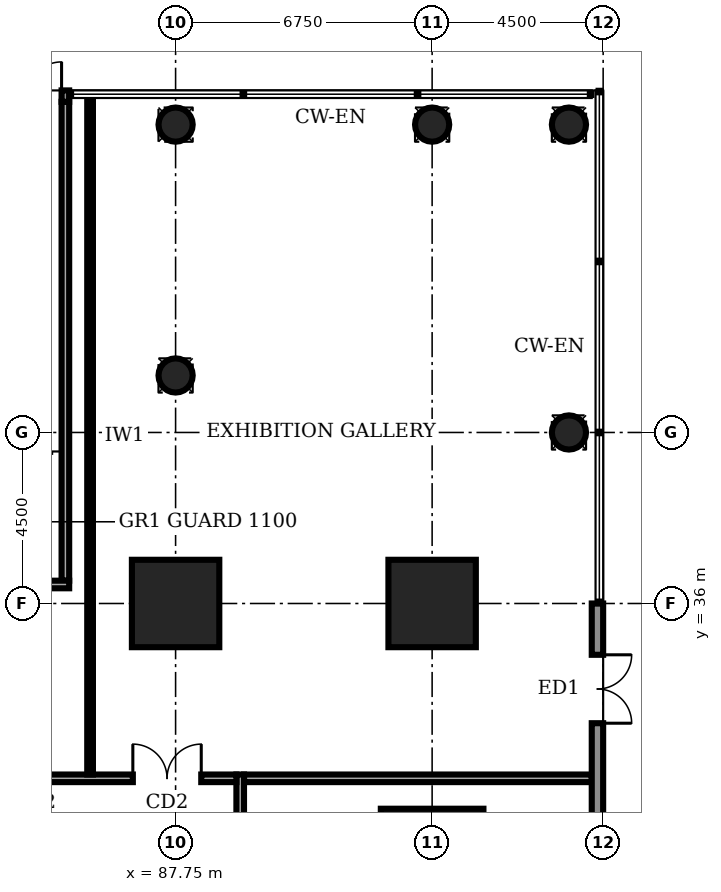
"""IFC4 building model, lengths in metres.
Left out: names, types, materials, properties, quantities, classifications, styles, units other than length and angle.
Written with IfcOpenShell. Run it as: python <this file> out.ifc"""

import sys

from ifc_helpers import new_model, si_unit, direction, frame, frame_2d, origin, origin_2d, place, context, subcontext, project, spatial, rectangle, circle, extrude, element, fill, save


model = new_model("IFC4")
c1 = context("Model", 3, precision=1e-05, world=origin(), true_north=direction((0.0, 1.0)))
c2 = subcontext(c1, "Body", "Model", "MODEL_VIEW")
j1 = project(units=[si_unit("LENGTHUNIT", "METRE"), si_unit("PLANEANGLEUNIT", "RADIAN")], contexts=[c1])
p1 = place(None, origin())
s1 = spatial("IfcSite", under=j1, at=p1, CompositionType="ELEMENT")
p2 = place(p1, origin())
s2 = spatial("IfcBuilding", under=s1, at=p2, CompositionType="ELEMENT")
p3 = place(p2, origin())
s3 = spatial("IfcBuildingStorey", under=s2, at=p3, CompositionType="ELEMENT", Elevation=0.0)
p4 = place(p3, frame((94.5, 29.25, -0.4), z_axis=(0.0, 0.0, 1.0), x_axis=(1.0, 0.0, 0.0)))
e1 = element("IfcColumn", 1, at=p4, inside=s3, PredefinedType="COLUMN", context=c2, shape_type="SweptSolid", body=[
    extrude(rectangle(XDim=2.7, YDim=2.7, at=origin_2d()), origin(), (0.0, 0.0, 1.0), 6.4),
])
for number, where, z_axis, x_axis in (
    (2, (87.75, 36.0, -0.4), (0.0, 0.0, 1.0), (1.0, 0.0, 0.0)),
    (3, (94.5, 36.0, -0.4), (0.0, 0.0, 1.0), (1.0, 0.0, 0.0)),
):
    element("IfcColumn", number, at=place(p3, frame(where, z_axis=z_axis, x_axis=x_axis)), inside=s3, PredefinedType="COLUMN", context=c2, shape_type="SweptSolid", body=[
        extrude(rectangle(XDim=2.3, YDim=2.3, at=origin_2d()), origin(), (0.0, 0.0, 1.0), 6.4),
    ])
for number, where, z_axis, x_axis in (
    (4, (87.75, 42.0, -0.4), (0.0, 0.0, 1.0), (1.0, 0.0, 0.0)),
    (5, (98.1, 40.5, -0.4), (0.0, 0.0, 1.0), (1.0, 0.0, 0.0)),
    (6, (87.75, 48.6, -0.4), (0.0, 0.0, 1.0), (1.0, 0.0, 0.0)),
    (7, (94.5, 48.6, -0.4), (0.0, 0.0, 1.0), (1.0, 0.0, 0.0)),
    (8, (98.1, 48.6, -0.4), (0.0, 0.0, 1.0), (1.0, 0.0, 0.0)),
):
    element("IfcColumn", number, at=place(p3, frame(where, z_axis=z_axis, x_axis=x_axis)), inside=s3, PredefinedType="COLUMN", context=c2, shape_type="SweptSolid", body=[
        extrude(circle(Radius=0.45, at=origin_2d()), origin(), (0.0, 0.0, 1.0), 6.4),
    ])
p5 = place(p3, frame((98.85, 27.0, 0.0), z_axis=(0.0, 0.0, 1.0), x_axis=(0.0, 1.0, 0.0)))
e9 = element("IfcWall", 9, at=p5, inside=s3, PredefinedType="STANDARD", context=c2, shape_type="SweptSolid", body=[
    extrude(rectangle(XDim=9.0, YDim=0.3, at=frame_2d((4.5, 0.0))), origin(), (0.0, 0.0, 1.0), 5.7),
])
p6 = place(p5, frame((5.85, 0.0, 0.0)))
e10 = element("IfcOpeningElement", 10, at=p6, cuts=e9, PredefinedType="OPENING", context=c2, shape_type="SweptSolid", body=[
    extrude(rectangle(XDim=1.8, YDim=2.4, at=frame_2d((0.9, 1.2))), frame((0.0, 0.16, 0.0), z_axis=(0.0, -1.0, 0.0), x_axis=(1.0, 0.0, 0.0)), (0.0, 0.0, 1.0), 0.32),
])
p7 = place(p3, frame((84.95, 49.35, 0.0), z_axis=(0.0, 0.0, 1.0), x_axis=(-1.0, 0.0, 0.0)))
e11 = element("IfcWall", 11, at=p7, inside=s3, PredefinedType="STANDARD", context=c2, shape_type="SweptSolid", body=[
    extrude(rectangle(XDim=2.2, YDim=0.3, at=frame_2d((1.1, 0.0))), origin(), (0.0, 0.0, 1.0), 5.7),
])
p8 = place(p7, frame((0.2, 0.0, 0.0)))
e12 = element("IfcOpeningElement", 12, at=p8, cuts=e11, PredefinedType="OPENING", context=c2, shape_type="SweptSolid", body=[
    extrude(rectangle(XDim=1.8, YDim=2.4, at=frame_2d((0.9, 1.2))), frame((0.0, 0.16, 0.0), z_axis=(0.0, -1.0, 0.0), x_axis=(1.0, 0.0, 0.0)), (0.0, 0.0, 1.0), 0.32),
])
p9 = place(p3, frame((89.45, 9.2, 0.0), z_axis=(0.0, 0.0, 1.0), x_axis=(0.0, 1.0, 0.0)))
e13 = element("IfcWall", 13, at=p9, inside=s3, PredefinedType="SOLIDWALL", context=c2, shape_type="SweptSolid", body=[
    extrude(rectangle(XDim=22.3, YDim=0.2, at=frame_2d((11.15, 0.0))), origin(), (0.0, 0.0, 1.0), 5.7),
])
p10 = place(p9, frame((1.55, 0.0, 0.0)))
e14 = element("IfcOpeningElement", 14, at=p10, cuts=e13, PredefinedType="OPENING", context=c2, shape_type="SweptSolid", body=[
    extrude(rectangle(XDim=1.0, YDim=2.1, at=frame_2d((0.5, 1.05))), frame((0.0, 0.11, 0.0), z_axis=(0.0, -1.0, 0.0), x_axis=(1.0, 0.0, 0.0)), (0.0, 0.0, 1.0), 0.22),
])
p11 = place(p9, frame((5.75, 0.0, 0.0)))
e15 = element("IfcOpeningElement", 15, at=p11, cuts=e13, PredefinedType="OPENING", context=c2, shape_type="SweptSolid", body=[
    extrude(rectangle(XDim=0.9, YDim=2.1, at=frame_2d((0.45, 1.05))), frame((0.0, 0.11, 0.0), z_axis=(0.0, -1.0, 0.0), x_axis=(1.0, 0.0, 0.0)), (0.0, 0.0, 1.0), 0.22),
])
p12 = place(p9, frame((8.75, 0.0, 0.0)))
e16 = element("IfcOpeningElement", 16, at=p12, cuts=e13, PredefinedType="OPENING", context=c2, shape_type="SweptSolid", body=[
    extrude(rectangle(XDim=0.9, YDim=2.1, at=frame_2d((0.45, 1.05))), frame((0.0, 0.11, 0.0), z_axis=(0.0, -1.0, 0.0), x_axis=(1.0, 0.0, 0.0)), (0.0, 0.0, 1.0), 0.22),
])
p13 = place(p9, frame((13.6, 0.0, 0.0)))
e17 = element("IfcOpeningElement", 17, at=p13, cuts=e13, PredefinedType="OPENING", context=c2, shape_type="SweptSolid", body=[
    extrude(rectangle(XDim=0.9, YDim=2.1, at=frame_2d((0.45, 1.05))), frame((0.0, 0.11, 0.0), z_axis=(0.0, -1.0, 0.0), x_axis=(1.0, 0.0, 0.0)), (0.0, 0.0, 1.0), 0.22),
])
p14 = place(p9, frame((16.3, 0.0, 0.0)))
e18 = element("IfcOpeningElement", 18, at=p14, cuts=e13, PredefinedType="OPENING", context=c2, shape_type="SweptSolid", body=[
    extrude(rectangle(XDim=1.0, YDim=2.1, at=frame_2d((0.5, 1.05))), frame((0.0, 0.11, 0.0), z_axis=(0.0, -1.0, 0.0), x_axis=(1.0, 0.0, 0.0)), (0.0, 0.0, 1.0), 0.22),
])
p15 = place(p9, frame((10.8, 0.0, 0.0)))
e19 = element("IfcOpeningElement", 19, at=p15, cuts=e13, PredefinedType="OPENING", context=c2, shape_type="SweptSolid", body=[
    extrude(rectangle(XDim=1.0, YDim=2.1, at=frame_2d((0.5, 1.05))), frame((0.0, 0.11, 0.0), z_axis=(0.0, -1.0, 0.0), x_axis=(1.0, 0.0, 0.0)), (0.0, 0.0, 1.0), 0.22),
])
p16 = place(p9, frame((19.25, 0.0, 0.0)))
e20 = element("IfcOpeningElement", 20, at=p16, cuts=e13, PredefinedType="OPENING", context=c2, shape_type="SweptSolid", body=[
    extrude(rectangle(XDim=1.6, YDim=2.1, at=frame_2d((0.8, 1.05))), frame((0.0, 0.11, 0.0), z_axis=(0.0, -1.0, 0.0), x_axis=(1.0, 0.0, 0.0)), (0.0, 0.0, 1.0), 0.22),
])
p17 = place(p3, frame((89.35, 31.4, 0.0), z_axis=(0.0, 0.0, 1.0), x_axis=(-1.0, 0.0, 0.0)))
e21 = element("IfcWall", 21, at=p17, inside=s3, PredefinedType="SOLIDWALL", context=c2, shape_type="SweptSolid", body=[
    extrude(rectangle(XDim=16.9, YDim=0.2, at=frame_2d((8.45, 0.0))), origin(), (0.0, 0.0, 1.0), 5.7),
])
p18 = place(p17, frame((13.975, 0.0, 0.0)))
e22 = element("IfcOpeningElement", 22, at=p18, cuts=e21, PredefinedType="OPENING", context=c2, shape_type="SweptSolid", body=[
    extrude(rectangle(XDim=1.8, YDim=2.1, at=frame_2d((0.9, 1.05))), frame((0.0, 0.11, 0.0), z_axis=(0.0, -1.0, 0.0), x_axis=(1.0, 0.0, 0.0)), (0.0, 0.0, 1.0), 0.22),
])
p19 = place(p17, frame((7.85, 0.0, 0.0)))
e23 = element("IfcOpeningElement", 23, at=p19, cuts=e21, PredefinedType="OPENING", context=c2, shape_type="SweptSolid", body=[
    extrude(rectangle(XDim=1.0, YDim=2.1, at=frame_2d((0.5, 1.05))), frame((0.0, 0.11, 0.0), z_axis=(0.0, -1.0, 0.0), x_axis=(1.0, 0.0, 0.0)), (0.0, 0.0, 1.0), 0.22),
])
p20 = place(p17, frame((0.925, 0.0, 0.0)))
e24 = element("IfcOpeningElement", 24, at=p20, cuts=e21, PredefinedType="OPENING", context=c2, shape_type="SweptSolid", body=[
    extrude(rectangle(XDim=1.8, YDim=2.1, at=frame_2d((0.9, 1.05))), frame((0.0, 0.11, 0.0), z_axis=(0.0, -1.0, 0.0), x_axis=(1.0, 0.0, 0.0)), (0.0, 0.0, 1.0), 0.22),
])
p21 = place(p3, frame((89.55, 31.4, 0.0), z_axis=(0.0, 0.0, 1.0), x_axis=(1.0, 0.0, 0.0)))
e25 = element("IfcWall", 25, at=p21, inside=s3, PredefinedType="SOLIDWALL", context=c2, shape_type="SweptSolid", body=[
    extrude(rectangle(XDim=9.15, YDim=0.2, at=frame_2d((4.575, 0.0))), origin(), (0.0, 0.0, 1.0), 5.7),
])
p22 = place(p3, frame((85.5, 31.5, 0.0), z_axis=(0.0, 0.0, 1.0), x_axis=(0.0, 1.0, 0.0)))
e26 = element("IfcWall", 26, at=p22, inside=s3, PredefinedType="PARTITIONING", context=c2, shape_type="SweptSolid", body=[
    extrude(rectangle(XDim=17.82, YDim=0.15, at=frame_2d((8.91, 0.0))), origin(), (0.0, 0.0, 1.0), 5.7),
])
p23 = place(p3, frame((77.05, 36.5, 0.0), z_axis=(0.0, 0.0, 1.0), x_axis=(1.0, 0.0, 0.0)))
e27 = element("IfcWall", 27, at=p23, inside=s3, PredefinedType="SOLIDWALL", context=c2, shape_type="SweptSolid", body=[
    extrude(rectangle(XDim=7.9, YDim=0.2, at=frame_2d((3.95, 0.0))), origin(), (0.0, 0.0, 1.0), 5.7),
])
p24 = place(p3, frame((84.85, 36.6, 0.0), z_axis=(0.0, 0.0, 1.0), x_axis=(0.0, 1.0, 0.0)))
e28 = element("IfcWall", 28, at=p24, inside=s3, PredefinedType="SOLIDWALL", context=c2, shape_type="SweptSolid", body=[
    extrude(rectangle(XDim=12.6, YDim=0.2, at=frame_2d((6.3, 0.0))), origin(), (0.0, 0.0, 1.0), 5.7),
])
p25 = place(p6, frame((1.8, 0.0, 0.0), z_axis=(0.0, 0.0, 1.0), x_axis=(-1.0, 0.0, 0.0)))
e29 = element("IfcDoor", 29, at=p25, inside=s3, OperationType="DOUBLE_DOOR_SINGLE_SWING", PredefinedType="DOOR", context=c2, shape_type="SweptSolid", body=[
    extrude(rectangle(XDim=1.8, YDim=2.4, at=frame_2d((0.9, 1.2))), frame((0.0, 0.025, 0.0), z_axis=(0.0, -1.0, 0.0), x_axis=(1.0, 0.0, 0.0)), (0.0, 0.0, 1.0), 0.05),
])
fill(e10, e29)
p26 = place(p8, frame((1.8, 0.0, 0.0), z_axis=(0.0, 0.0, 1.0), x_axis=(-1.0, 0.0, 0.0)))
e30 = element("IfcDoor", 30, at=p26, inside=s3, OperationType="DOUBLE_DOOR_SINGLE_SWING", PredefinedType="DOOR", context=c2, shape_type="SweptSolid", body=[
    extrude(rectangle(XDim=1.8, YDim=2.4, at=frame_2d((0.9, 1.2))), frame((0.0, 0.025, 0.0), z_axis=(0.0, -1.0, 0.0), x_axis=(1.0, 0.0, 0.0)), (0.0, 0.0, 1.0), 0.05),
])
fill(e12, e30)
p27 = place(p20, frame((1.8, 0.0, 0.0), z_axis=(0.0, 0.0, 1.0), x_axis=(-1.0, 0.0, 0.0)))
e31 = element("IfcDoor", 31, at=p27, inside=s3, OperationType="DOUBLE_DOOR_SINGLE_SWING", PredefinedType="DOOR", context=c2, shape_type="SweptSolid", body=[
    extrude(rectangle(XDim=1.8, YDim=2.1, at=frame_2d((0.9, 1.05))), frame((0.0, 0.025, 0.0), z_axis=(0.0, -1.0, 0.0), x_axis=(1.0, 0.0, 0.0)), (0.0, 0.0, 1.0), 0.05),
])
fill(e24, e31)
save(model, sys.argv[1])
